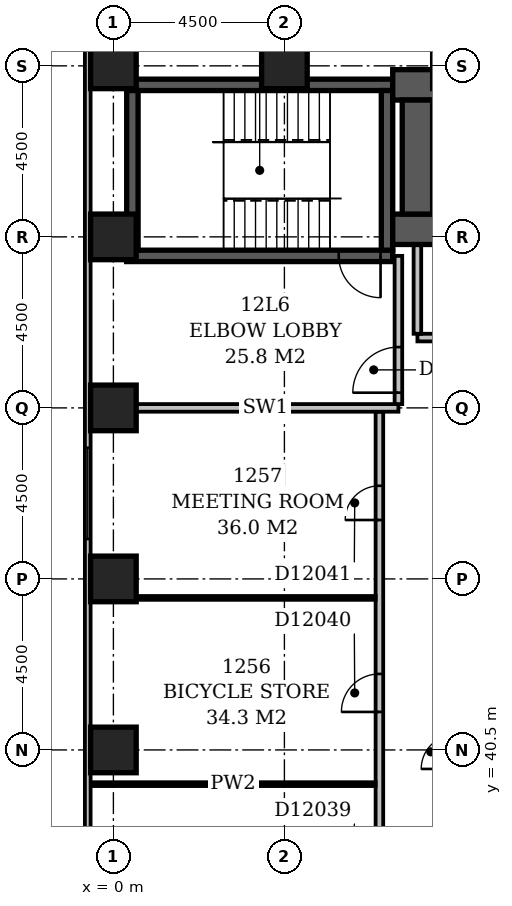
"""IFC4 building model, lengths in metres.
Left out: names, types, materials, properties, quantities, classifications, styles, units other than length and angle.
Written with IfcOpenShell. Run it as: python <this file> out.ifc"""

import sys

from ifc_helpers import new_model, si_unit, direction, frame, frame_2d, origin, origin_2d, place, context, subcontext, project, spatial, rectangle, extrude, element, fill, save


model = new_model("IFC4")
c1 = context("Model", 3, precision=1e-05, world=origin(), true_north=direction((0.0, 1.0)))
c2 = subcontext(c1, "Body", "Model", "MODEL_VIEW")
j1 = project(units=[si_unit("LENGTHUNIT", "METRE"), si_unit("PLANEANGLEUNIT", "RADIAN")], contexts=[c1])
p1 = place(None, origin())
s1 = spatial("IfcSite", under=j1, at=p1, CompositionType="ELEMENT")
p2 = place(p1, origin())
s2 = spatial("IfcBuilding", under=s1, at=p2, CompositionType="ELEMENT")
p3 = place(p2, frame((0.0, 0.0, 54.2)))
s3 = spatial("IfcBuildingStorey", under=s2, at=p3, CompositionType="ELEMENT", Elevation=54.2)
p4 = place(p3, frame((0.35, 53.5, -0.3), z_axis=(0.0, 0.0, 1.0), x_axis=(1.0, 0.0, 0.0)))
e1 = element("IfcWall", 1, at=p4, inside=s3, PredefinedType="SHEAR", context=c2, shape_type="SweptSolid", body=[
    extrude(rectangle(XDim=7.0, YDim=0.3, at=frame_2d((3.5, 0.0))), origin(), (0.0, 0.0, 1.0), 3.6),
])
p5 = place(p4, frame((5.58, 0.0, 0.3)))
e2 = element("IfcOpeningElement", 2, at=p5, cuts=e1, PredefinedType="OPENING", context=c2, shape_type="SweptSolid", body=[
    extrude(rectangle(XDim=1.1, YDim=2.1, at=frame_2d((0.55, 1.05))), frame((0.0, 0.162, 0.0), z_axis=(0.0, -1.0, 0.0), x_axis=(1.0, 0.0, 0.0)), (0.0, 0.0, 1.0), 0.324),
])
p6 = place(p3, frame((0.35, 58.0, -0.3), z_axis=(0.0, 0.0, 1.0), x_axis=(1.0, 0.0, 0.0)))
e3 = element("IfcWall", 3, at=p6, inside=s3, PredefinedType="SHEAR", context=c2, shape_type="SweptSolid", body=[
    extrude(rectangle(XDim=7.0, YDim=0.3, at=frame_2d((3.5, 0.0))), origin(), (0.0, 0.0, 1.0), 3.6),
])
for number, where, z_axis, x_axis in (
    (4, (0.5, 53.65, -0.3), (0.0, 0.0, 1.0), (0.0, 1.0, 0.0)),
    (5, (7.2, 53.65, -0.3), (0.0, 0.0, 1.0), (0.0, 1.0, 0.0)),
):
    element("IfcWall", number, at=place(p3, frame(where, z_axis=z_axis, x_axis=x_axis)), inside=s3, PredefinedType="SHEAR", context=c2, shape_type="SweptSolid", body=[
        extrude(rectangle(XDim=4.2, YDim=0.3, at=frame_2d((2.1, 0.0))), origin(), (0.0, 0.0, 1.0), 3.6),
    ])
p7 = place(p3, frame((7.35, 54.2, -0.3), z_axis=(0.0, 0.0, 1.0), x_axis=(1.0, 0.0, 0.0)))
e6 = element("IfcWall", 6, at=p7, inside=s3, PredefinedType="SHEAR", context=c2, shape_type="SweptSolid", body=[
    extrude(rectangle(XDim=16.45, YDim=0.8, at=frame_2d((8.225, 0.0))), origin(), (0.0, 0.0, 1.0), 3.6),
])
p8 = place(p7, frame((1.35, 0.0, 0.3)))
e7 = element("IfcOpeningElement", 7, at=p8, cuts=e6, PredefinedType="OPENING", context=c2, shape_type="SweptSolid", body=[
    extrude(rectangle(XDim=1.1, YDim=2.1, at=frame_2d((0.55, 1.05))), frame((0.0, 0.412, 0.0), z_axis=(0.0, -1.0, 0.0), x_axis=(1.0, 0.0, 0.0)), (0.0, 0.0, 1.0), 0.824),
])
p9 = place(p7, frame((3.85, 0.0, 0.3)))
e8 = element("IfcOpeningElement", 8, at=p9, cuts=e6, PredefinedType="OPENING", context=c2, shape_type="SweptSolid", body=[
    extrude(rectangle(XDim=1.1, YDim=2.1, at=frame_2d((0.55, 1.05))), frame((0.0, 0.412, 0.0), z_axis=(0.0, -1.0, 0.0), x_axis=(1.0, 0.0, 0.0)), (0.0, 0.0, 1.0), 0.824),
])
p10 = place(p7, frame((6.35, 0.0, 0.3)))
e9 = element("IfcOpeningElement", 9, at=p10, cuts=e6, PredefinedType="OPENING", context=c2, shape_type="SweptSolid", body=[
    extrude(rectangle(XDim=1.1, YDim=2.1, at=frame_2d((0.55, 1.05))), frame((0.0, 0.412, 0.0), z_axis=(0.0, -1.0, 0.0), x_axis=(1.0, 0.0, 0.0)), (0.0, 0.0, 1.0), 0.824),
])
p11 = place(p7, frame((8.85, 0.0, 0.3)))
e10 = element("IfcOpeningElement", 10, at=p11, cuts=e6, PredefinedType="OPENING", context=c2, shape_type="SweptSolid", body=[
    extrude(rectangle(XDim=1.1, YDim=2.1, at=frame_2d((0.55, 1.05))), frame((0.0, 0.412, 0.0), z_axis=(0.0, -1.0, 0.0), x_axis=(1.0, 0.0, 0.0)), (0.0, 0.0, 1.0), 0.824),
])
p12 = place(p7, frame((11.35, 0.0, 0.3)))
e11 = element("IfcOpeningElement", 11, at=p12, cuts=e6, PredefinedType="OPENING", context=c2, shape_type="SweptSolid", body=[
    extrude(rectangle(XDim=1.1, YDim=2.1, at=frame_2d((0.55, 1.05))), frame((0.0, 0.412, 0.0), z_axis=(0.0, -1.0, 0.0), x_axis=(1.0, 0.0, 0.0)), (0.0, 0.0, 1.0), 0.824),
])
p13 = place(p7, frame((13.85, 0.0, 0.3)))
e12 = element("IfcOpeningElement", 12, at=p13, cuts=e6, PredefinedType="OPENING", context=c2, shape_type="SweptSolid", body=[
    extrude(rectangle(XDim=1.1, YDim=2.1, at=frame_2d((0.55, 1.05))), frame((0.0, 0.412, 0.0), z_axis=(0.0, -1.0, 0.0), x_axis=(1.0, 0.0, 0.0)), (0.0, 0.0, 1.0), 0.824),
])
p14 = place(p3, frame((7.35, 58.0, -0.3), z_axis=(0.0, 0.0, 1.0), x_axis=(1.0, 0.0, 0.0)))
e13 = element("IfcWall", 13, at=p14, inside=s3, PredefinedType="SHEAR", context=c2, shape_type="SweptSolid", body=[
    extrude(rectangle(XDim=16.45, YDim=0.8, at=frame_2d((8.225, 0.0))), origin(), (0.0, 0.0, 1.0), 3.6),
])
p15 = place(p3, frame((8.0, 54.6, -0.3), z_axis=(0.0, 0.0, 1.0), x_axis=(0.0, 1.0, 0.0)))
e14 = element("IfcWall", 14, at=p15, inside=s3, PredefinedType="SHEAR", context=c2, shape_type="SweptSolid", body=[
    extrude(rectangle(XDim=3.0, YDim=0.8, at=frame_2d((1.5, 0.0))), origin(), (0.0, 0.0, 1.0), 3.6),
])
for number, where, z_axis, x_axis in (
    (15, (0.0, 40.5, -0.3), (0.0, 0.0, 1.0), (1.0, 0.0, 0.0)),
    (16, (0.0, 45.0, -0.3), (0.0, 0.0, 1.0), (1.0, 0.0, 0.0)),
    (17, (0.0, 49.5, -0.3), (0.0, 0.0, 1.0), (1.0, 0.0, 0.0)),
    (18, (0.0, 54.0, -0.3), (0.0, 0.0, 1.0), (1.0, 0.0, 0.0)),
    (19, (0.0, 58.5, -0.3), (0.0, 0.0, 1.0), (1.0, 0.0, 0.0)),
    (20, (4.5, 58.5, -0.3), (0.0, 0.0, 1.0), (1.0, 0.0, 0.0)),
):
    element("IfcColumn", number, at=place(p3, frame(where, z_axis=z_axis, x_axis=x_axis)), inside=s3, PredefinedType="COLUMN", context=c2, shape_type="SweptSolid", body=[
        extrude(rectangle(XDim=1.2, YDim=1.2, at=origin_2d()), origin(), (0.0, 0.0, 1.0), 3.6),
    ])
p16 = place(p3, frame((-0.675, 59.1, 0.0), z_axis=(0.0, 0.0, 1.0), x_axis=(0.0, -1.0, 0.0)))
e21 = element("IfcWall", 21, at=p16, inside=s3, PredefinedType="STANDARD", context=c2, shape_type="SweptSolid", body=[
    extrude(rectangle(XDim=55.35, YDim=0.15, at=frame_2d((27.675, 0.0))), origin(), (0.0, 0.0, 1.0), 2.7),
])
p17 = place(p16, frame((10.65, 0.0, 0.6)))
e22 = element("IfcOpeningElement", 22, at=p17, cuts=e21, PredefinedType="OPENING", context=c2, shape_type="SweptSolid", body=[
    extrude(rectangle(XDim=2.4, YDim=1.8, at=frame_2d((1.2, 0.9))), frame((0.0, 0.087, 0.0), z_axis=(0.0, -1.0, 0.0), x_axis=(1.0, 0.0, 0.0)), (0.0, 0.0, 1.0), 0.174),
])
p18 = place(p16, frame((42.15, 0.0, 0.6)))
e23 = element("IfcOpeningElement", 23, at=p18, cuts=e21, PredefinedType="OPENING", context=c2, shape_type="SweptSolid", body=[
    extrude(rectangle(XDim=2.4, YDim=1.8, at=frame_2d((1.2, 0.9))), frame((0.0, 0.087, 0.0), z_axis=(0.0, -1.0, 0.0), x_axis=(1.0, 0.0, 0.0)), (0.0, 0.0, 1.0), 0.174),
])
p19 = place(p3, frame((8.0, 51.35, 0.0), z_axis=(0.0, 0.0, 1.0), x_axis=(1.0, 0.0, 0.0)))
e24 = element("IfcWall", 24, at=p19, inside=s3, PredefinedType="PARTITIONING", context=c2, shape_type="SweptSolid", body=[
    extrude(rectangle(XDim=15.0, YDim=0.2, at=frame_2d((7.5, 0.0))), origin(), (0.0, 0.0, 1.0), 3.3),
])
p20 = place(p19, frame((3.4, 0.0, 0.0)))
e25 = element("IfcOpeningElement", 25, at=p20, cuts=e24, PredefinedType="OPENING", context=c2, shape_type="SweptSolid", body=[
    extrude(rectangle(XDim=1.2, YDim=2.1, at=frame_2d((0.6, 1.05))), frame((0.0, 0.112, 0.0), z_axis=(0.0, -1.0, 0.0), x_axis=(1.0, 0.0, 0.0)), (0.0, 0.0, 1.0), 0.224),
])
p21 = place(p19, frame((9.4, 0.0, 0.0)))
e26 = element("IfcOpeningElement", 26, at=p21, cuts=e24, PredefinedType="OPENING", context=c2, shape_type="SweptSolid", body=[
    extrude(rectangle(XDim=1.2, YDim=2.1, at=frame_2d((0.6, 1.05))), frame((0.0, 0.112, 0.0), z_axis=(0.0, -1.0, 0.0), x_axis=(1.0, 0.0, 0.0)), (0.0, 0.0, 1.0), 0.224),
])
p22 = place(p3, frame((8.0, 51.45, 0.0), z_axis=(0.0, 0.0, 1.0), x_axis=(0.0, 1.0, 0.0)))
e27 = element("IfcWall", 27, at=p22, inside=s3, PredefinedType="PARTITIONING", context=c2, shape_type="SweptSolid", body=[
    extrude(rectangle(XDim=2.33, YDim=0.2, at=frame_2d((1.165, 0.0))), origin(), (0.0, 0.0, 1.0), 3.3),
])
p23 = place(p3, frame((0.5, 49.5, 0.0), z_axis=(0.0, 0.0, 1.0), x_axis=(1.0, 0.0, 0.0)))
e28 = element("IfcWall", 28, at=p23, inside=s3, PredefinedType="PARTITIONING", context=c2, shape_type="SweptSolid", body=[
    extrude(rectangle(XDim=7.0, YDim=0.2, at=frame_2d((3.5, 0.0))), origin(), (0.0, 0.0, 1.0), 3.3),
])
p24 = place(p3, frame((7.5, 49.6, 0.0), z_axis=(0.0, 0.0, 1.0), x_axis=(0.0, 1.0, 0.0)))
e29 = element("IfcWall", 29, at=p24, inside=s3, PredefinedType="PARTITIONING", context=c2, shape_type="SweptSolid", body=[
    extrude(rectangle(XDim=3.9, YDim=0.2, at=frame_2d((1.95, 0.0))), origin(), (0.0, 0.0, 1.0), 3.3),
])
p25 = place(p24, frame((0.3, 0.0, 0.0)))
e30 = element("IfcOpeningElement", 30, at=p25, cuts=e29, PredefinedType="OPENING", context=c2, shape_type="SweptSolid", body=[
    extrude(rectangle(XDim=1.2, YDim=2.1, at=frame_2d((0.6, 1.05))), frame((0.0, 0.112, 0.0), z_axis=(0.0, -1.0, 0.0), x_axis=(1.0, 0.0, 0.0)), (0.0, 0.0, 1.0), 0.224),
])
p26 = place(p3, frame((7.0, 34.6, 0.0), z_axis=(0.0, 0.0, 1.0), x_axis=(0.0, 1.0, 0.0)))
e31 = element("IfcWall", 31, at=p26, inside=s3, PredefinedType="PARTITIONING", context=c2, shape_type="SweptSolid", body=[
    extrude(rectangle(XDim=14.8, YDim=0.2, at=frame_2d((7.4, 0.0))), origin(), (0.0, 0.0, 1.0), 3.3),
])
p27 = place(p26, frame((1.9, 0.0, 0.0)))
e32 = element("IfcOpeningElement", 32, at=p27, cuts=e31, PredefinedType="OPENING", context=c2, shape_type="SweptSolid", body=[
    extrude(rectangle(XDim=1.0, YDim=2.1, at=frame_2d((0.5, 1.05))), frame((0.0, 0.112, 0.0), z_axis=(0.0, -1.0, 0.0), x_axis=(1.0, 0.0, 0.0)), (0.0, 0.0, 1.0), 0.224),
])
p28 = place(p26, frame((6.9, 0.0, 0.0)))
e33 = element("IfcOpeningElement", 33, at=p28, cuts=e31, PredefinedType="OPENING", context=c2, shape_type="SweptSolid", body=[
    extrude(rectangle(XDim=1.0, YDim=2.1, at=frame_2d((0.5, 1.05))), frame((0.0, 0.112, 0.0), z_axis=(0.0, -1.0, 0.0), x_axis=(1.0, 0.0, 0.0)), (0.0, 0.0, 1.0), 0.224),
])
p29 = place(p26, frame((11.95, 0.0, 0.0)))
e34 = element("IfcOpeningElement", 34, at=p29, cuts=e31, PredefinedType="OPENING", context=c2, shape_type="SweptSolid", body=[
    extrude(rectangle(XDim=0.9, YDim=2.1, at=frame_2d((0.45, 1.05))), frame((0.0, 0.112, 0.0), z_axis=(0.0, -1.0, 0.0), x_axis=(1.0, 0.0, 0.0)), (0.0, 0.0, 1.0), 0.224),
])
p30 = place(p3, frame((-0.6, 39.6, 0.0), z_axis=(0.0, 0.0, 1.0), x_axis=(1.0, 0.0, 0.0)))
e35 = element("IfcWall", 35, at=p30, inside=s3, PredefinedType="PARTITIONING", context=c2, shape_type="SweptSolid", body=[
    extrude(rectangle(XDim=7.5, YDim=0.1, at=frame_2d((3.75, 0.0))), origin(), (0.0, 0.0, 1.0), 3.3),
])
p31 = place(p3, frame((0.6, 44.5, 0.0), z_axis=(0.0, 0.0, 1.0), x_axis=(1.0, 0.0, 0.0)))
e36 = element("IfcWall", 36, at=p31, inside=s3, PredefinedType="PARTITIONING", context=c2, shape_type="SweptSolid", body=[
    extrude(rectangle(XDim=6.3, YDim=0.1, at=frame_2d((3.15, 0.0))), origin(), (0.0, 0.0, 1.0), 3.3),
])
p32 = place(p17, origin())
e37 = element("IfcWindow", 37, at=p32, inside=s3, PartitioningType="SINGLE_PANEL", PredefinedType="WINDOW", context=c2, shape_type="SweptSolid", body=[
    extrude(rectangle(XDim=2.4, YDim=1.8, at=frame_2d((1.2, 0.9))), frame((0.0, 0.03, 0.0), z_axis=(0.0, -1.0, 0.0), x_axis=(1.0, 0.0, 0.0)), (0.0, 0.0, 1.0), 0.06),
])
fill(e22, e37)
p33 = place(p25, origin())
e38 = element("IfcDoor", 38, at=p33, inside=s3, OperationType="SINGLE_SWING_LEFT", PredefinedType="DOOR", context=c2, shape_type="SweptSolid", body=[
    extrude(rectangle(XDim=1.2, YDim=2.1, at=frame_2d((0.6, 1.05))), frame((0.0, 0.025, 0.0), z_axis=(0.0, -1.0, 0.0), x_axis=(1.0, 0.0, 0.0)), (0.0, 0.0, 1.0), 0.05),
])
fill(e30, e38)
p34 = place(p5, origin())
e39 = element("IfcDoor", 39, at=p34, inside=s3, OperationType="SINGLE_SWING_RIGHT", PredefinedType="DOOR", context=c2, shape_type="SweptSolid", body=[
    extrude(rectangle(XDim=1.1, YDim=2.1, at=frame_2d((0.55, 1.05))), frame((0.0, 0.025, 0.0), z_axis=(0.0, -1.0, 0.0), x_axis=(1.0, 0.0, 0.0)), (0.0, 0.0, 1.0), 0.05),
])
fill(e2, e39)
p35 = place(p28, origin())
e40 = element("IfcDoor", 40, at=p35, inside=s3, OperationType="SINGLE_SWING_LEFT", PredefinedType="DOOR", context=c2, shape_type="SweptSolid", body=[
    extrude(rectangle(XDim=1.0, YDim=2.1, at=frame_2d((0.5, 1.05))), frame((0.0, 0.025, 0.0), z_axis=(0.0, -1.0, 0.0), x_axis=(1.0, 0.0, 0.0)), (0.0, 0.0, 1.0), 0.05),
])
fill(e33, e40)
p36 = place(p29, origin())
e41 = element("IfcDoor", 41, at=p36, inside=s3, OperationType="SINGLE_SWING_LEFT", PredefinedType="DOOR", context=c2, shape_type="SweptSolid", body=[
    extrude(rectangle(XDim=0.9, YDim=2.1, at=frame_2d((0.45, 1.05))), frame((0.0, 0.025, 0.0), z_axis=(0.0, -1.0, 0.0), x_axis=(1.0, 0.0, 0.0)), (0.0, 0.0, 1.0), 0.05),
])
fill(e34, e41)
save(model, sys.argv[1])
